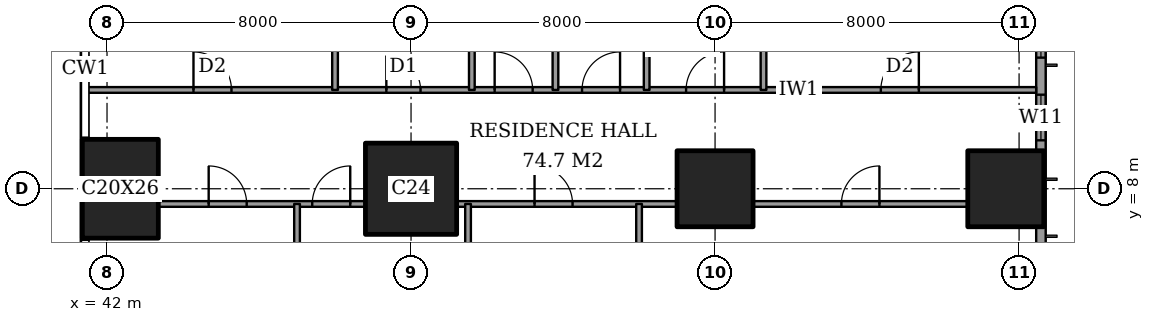
"""IFC4 building model, lengths in metres.
Left out: names, types, materials, properties, quantities, classifications, styles, units other than length and angle.
Written with IfcOpenShell. Run it as: python <this file> out.ifc"""

import sys

from ifc_helpers import new_model, si_unit, direction, frame, frame_2d, origin, origin_2d, place, context, subcontext, project, spatial, rectangle, extrude, element, fill, save


model = new_model("IFC4")
c1 = context("Model", 3, precision=1e-05, world=origin(), true_north=direction((0.0, 1.0)))
c2 = subcontext(c1, "Body", "Model", "MODEL_VIEW")
j1 = project(units=[si_unit("LENGTHUNIT", "METRE"), si_unit("PLANEANGLEUNIT", "RADIAN")], contexts=[c1])
p1 = place(None, origin())
s1 = spatial("IfcSite", under=j1, at=p1, CompositionType="ELEMENT")
p2 = place(p1, origin())
s2 = spatial("IfcBuilding", under=s1, at=p2, CompositionType="ELEMENT")
p3 = place(p2, frame((0.0, 0.0, 107.0)))
s3 = spatial("IfcBuildingStorey", under=s2, at=p3, CompositionType="ELEMENT", Elevation=107.0)
p4 = place(p3, frame((42.35, 8.0, 0.0), z_axis=(0.0, 0.0, 1.0), x_axis=(1.0, 0.0, 0.0)))
e1 = element("IfcColumn", 1, at=p4, inside=s3, PredefinedType="COLUMN", context=c2, shape_type="SweptSolid", body=[
    extrude(rectangle(XDim=2.0, YDim=2.6, at=origin_2d()), origin(), (0.0, 0.0, 1.0), 3.6),
])
p5 = place(p3, frame((50.0, 8.0, 0.0), z_axis=(0.0, 0.0, 1.0), x_axis=(1.0, 0.0, 0.0)))
e2 = element("IfcColumn", 2, at=p5, inside=s3, PredefinedType="COLUMN", context=c2, shape_type="SweptSolid", body=[
    extrude(rectangle(XDim=2.4, YDim=2.4, at=origin_2d()), origin(), (0.0, 0.0, 1.0), 3.6),
])
for number, where, z_axis, x_axis in (
    (3, (58.0, 8.0, 0.0), (0.0, 0.0, 1.0), (1.0, 0.0, 0.0)),
    (4, (65.65, 8.0, 0.0), (0.0, 0.0, 1.0), (1.0, 0.0, 0.0)),
):
    element("IfcColumn", number, at=place(p3, frame(where, z_axis=z_axis, x_axis=x_axis)), inside=s3, PredefinedType="COLUMN", context=c2, shape_type="SweptSolid", body=[
        extrude(rectangle(XDim=2.0, YDim=2.0, at=origin_2d()), origin(), (0.0, 0.0, 1.0), 3.6),
    ])
p6 = place(p3, frame((66.575, 3.175, 0.0), z_axis=(0.0, 0.0, 1.0), x_axis=(0.0, 1.0, 0.0)))
e5 = element("IfcWall", 5, at=p6, inside=s3, PredefinedType="SOLIDWALL", context=c2, shape_type="SweptSolid", body=[
    extrude(rectangle(XDim=41.65, YDim=0.25, at=frame_2d((20.825, 0.0))), origin(), (0.0, 0.0, 1.0), 3.6),
])
p7 = place(p6, frame((0.775, 0.0, 0.4)))
e6 = element("IfcOpeningElement", 6, at=p7, cuts=e5, PredefinedType="OPENING", context=c2, shape_type="SweptSolid", body=[
    extrude(rectangle(XDim=2.4, YDim=2.2, at=frame_2d((1.2, 1.1))), frame((0.0, 0.135, 0.0), z_axis=(0.0, -1.0, 0.0), x_axis=(1.0, 0.0, 0.0)), (0.0, 0.0, 1.0), 0.27),
])
p8 = place(p6, frame((6.1, 0.0, 0.4)))
e7 = element("IfcOpeningElement", 7, at=p8, cuts=e5, PredefinedType="OPENING", context=c2, shape_type="SweptSolid", body=[
    extrude(rectangle(XDim=1.2, YDim=2.2, at=frame_2d((0.6, 1.1))), frame((0.0, 0.135, 0.0), z_axis=(0.0, -1.0, 0.0), x_axis=(1.0, 0.0, 0.0)), (0.0, 0.0, 1.0), 0.27),
])
p9 = place(p6, frame((8.275, 0.0, 0.4)))
e8 = element("IfcOpeningElement", 8, at=p9, cuts=e5, PredefinedType="OPENING", context=c2, shape_type="SweptSolid", body=[
    extrude(rectangle(XDim=2.4, YDim=2.2, at=frame_2d((1.2, 1.1))), frame((0.0, 0.135, 0.0), z_axis=(0.0, -1.0, 0.0), x_axis=(1.0, 0.0, 0.0)), (0.0, 0.0, 1.0), 0.27),
])
p10 = place(p6, frame((15.775, 0.0, 0.4)))
e9 = element("IfcOpeningElement", 9, at=p10, cuts=e5, PredefinedType="OPENING", context=c2, shape_type="SweptSolid", body=[
    extrude(rectangle(XDim=2.4, YDim=2.2, at=frame_2d((1.2, 1.1))), frame((0.0, 0.135, 0.0), z_axis=(0.0, -1.0, 0.0), x_axis=(1.0, 0.0, 0.0)), (0.0, 0.0, 1.0), 0.27),
])
p11 = place(p6, frame((23.475, 0.0, 0.4)))
e10 = element("IfcOpeningElement", 10, at=p11, cuts=e5, PredefinedType="OPENING", context=c2, shape_type="SweptSolid", body=[
    extrude(rectangle(XDim=2.4, YDim=2.2, at=frame_2d((1.2, 1.1))), frame((0.0, 0.135, 0.0), z_axis=(0.0, -1.0, 0.0), x_axis=(1.0, 0.0, 0.0)), (0.0, 0.0, 1.0), 0.27),
])
p12 = place(p6, frame((30.975, 0.0, 0.4)))
e11 = element("IfcOpeningElement", 11, at=p12, cuts=e5, PredefinedType="OPENING", context=c2, shape_type="SweptSolid", body=[
    extrude(rectangle(XDim=2.4, YDim=2.2, at=frame_2d((1.2, 1.1))), frame((0.0, 0.135, 0.0), z_axis=(0.0, -1.0, 0.0), x_axis=(1.0, 0.0, 0.0)), (0.0, 0.0, 1.0), 0.27),
])
p13 = place(p6, frame((34.5, 0.0, 0.4)))
e12 = element("IfcOpeningElement", 12, at=p13, cuts=e5, PredefinedType="OPENING", context=c2, shape_type="SweptSolid", body=[
    extrude(rectangle(XDim=1.2, YDim=2.2, at=frame_2d((0.6, 1.1))), frame((0.0, 0.135, 0.0), z_axis=(0.0, -1.0, 0.0), x_axis=(1.0, 0.0, 0.0)), (0.0, 0.0, 1.0), 0.27),
])
p14 = place(p6, frame((38.475, 0.0, 0.4)))
e13 = element("IfcOpeningElement", 13, at=p14, cuts=e5, PredefinedType="OPENING", context=c2, shape_type="SweptSolid", body=[
    extrude(rectangle(XDim=2.4, YDim=2.2, at=frame_2d((1.2, 1.1))), frame((0.0, 0.135, 0.0), z_axis=(0.0, -1.0, 0.0), x_axis=(1.0, 0.0, 0.0)), (0.0, 0.0, 1.0), 0.27),
])
p15 = place(p3, frame((43.35, 7.6, 0.0), z_axis=(0.0, 0.0, 1.0), x_axis=(1.0, 0.0, 0.0)))
e14 = element("IfcWall", 14, at=p15, inside=s3, PredefinedType="PARTITIONING", context=c2, shape_type="SweptSolid", body=[
    extrude(rectangle(XDim=5.45, YDim=0.15, at=frame_2d((2.725, 0.0))), origin(), (0.0, 0.0, 1.0), 3.35),
])
p16 = place(p15, frame((4.05, 0.0, 0.0)))
e15 = element("IfcOpeningElement", 15, at=p16, cuts=e14, PredefinedType="OPENING", context=c2, shape_type="SweptSolid", body=[
    extrude(rectangle(XDim=1.0, YDim=2.1, at=frame_2d((0.5, 1.05))), frame((0.0, 0.085, 0.0), z_axis=(0.0, -1.0, 0.0), x_axis=(1.0, 0.0, 0.0)), (0.0, 0.0, 1.0), 0.17),
])
p17 = place(p15, frame((1.325, 0.0, 0.0)))
e16 = element("IfcOpeningElement", 16, at=p17, cuts=e14, PredefinedType="OPENING", context=c2, shape_type="SweptSolid", body=[
    extrude(rectangle(XDim=1.0, YDim=2.1, at=frame_2d((0.5, 1.05))), frame((0.0, 0.085, 0.0), z_axis=(0.0, -1.0, 0.0), x_axis=(1.0, 0.0, 0.0)), (0.0, 0.0, 1.0), 0.17),
])
p18 = place(p3, frame((51.2, 7.6, 0.0), z_axis=(0.0, 0.0, 1.0), x_axis=(1.0, 0.0, 0.0)))
e17 = element("IfcWall", 17, at=p18, inside=s3, PredefinedType="PARTITIONING", context=c2, shape_type="SweptSolid", body=[
    extrude(rectangle(XDim=5.8, YDim=0.15, at=frame_2d((2.9, 0.0))), origin(), (0.0, 0.0, 1.0), 3.35),
])
p19 = place(p18, frame((2.05, 0.0, 0.0)))
e18 = element("IfcOpeningElement", 18, at=p19, cuts=e17, PredefinedType="OPENING", context=c2, shape_type="SweptSolid", body=[
    extrude(rectangle(XDim=1.0, YDim=2.1, at=frame_2d((0.5, 1.05))), frame((0.0, 0.085, 0.0), z_axis=(0.0, -1.0, 0.0), x_axis=(1.0, 0.0, 0.0)), (0.0, 0.0, 1.0), 0.17),
])
p20 = place(p3, frame((59.0, 7.6, 0.0), z_axis=(0.0, 0.0, 1.0), x_axis=(1.0, 0.0, 0.0)))
e19 = element("IfcWall", 19, at=p20, inside=s3, PredefinedType="PARTITIONING", context=c2, shape_type="SweptSolid", body=[
    extrude(rectangle(XDim=5.65, YDim=0.15, at=frame_2d((2.825, 0.0))), origin(), (0.0, 0.0, 1.0), 3.35),
])
p21 = place(p20, frame((2.325, 0.0, 0.0)))
e20 = element("IfcOpeningElement", 20, at=p21, cuts=e19, PredefinedType="OPENING", context=c2, shape_type="SweptSolid", body=[
    extrude(rectangle(XDim=1.0, YDim=2.1, at=frame_2d((0.5, 1.05))), frame((0.0, 0.085, 0.0), z_axis=(0.0, -1.0, 0.0), x_axis=(1.0, 0.0, 0.0)), (0.0, 0.0, 1.0), 0.17),
])
p22 = place(p3, frame((41.439, 10.6, 0.0), z_axis=(0.0, 0.0, 1.0), x_axis=(1.0, 0.0, 0.0)))
e21 = element("IfcWall", 21, at=p22, inside=s3, PredefinedType="PARTITIONING", context=c2, shape_type="SweptSolid", body=[
    extrude(rectangle(XDim=25.011, YDim=0.15, at=frame_2d((12.505, 0.0))), origin(), (0.0, 0.0, 1.0), 3.35),
])
p23 = place(p22, frame((10.761, 0.0, 0.0)))
e22 = element("IfcOpeningElement", 22, at=p23, cuts=e21, PredefinedType="OPENING", context=c2, shape_type="SweptSolid", body=[
    extrude(rectangle(XDim=1.0, YDim=2.1, at=frame_2d((0.5, 1.05))), frame((0.0, 0.085, 0.0), z_axis=(0.0, -1.0, 0.0), x_axis=(1.0, 0.0, 0.0)), (0.0, 0.0, 1.0), 0.17),
])
p24 = place(p22, frame((20.924, 0.0, 0.0)))
e23 = element("IfcOpeningElement", 23, at=p24, cuts=e21, PredefinedType="OPENING", context=c2, shape_type="SweptSolid", body=[
    extrude(rectangle(XDim=1.0, YDim=2.1, at=frame_2d((0.5, 1.05))), frame((0.0, 0.085, 0.0), z_axis=(0.0, -1.0, 0.0), x_axis=(1.0, 0.0, 0.0)), (0.0, 0.0, 1.0), 0.17),
])
p25 = place(p22, frame((15.799, 0.0, 0.0)))
e24 = element("IfcOpeningElement", 24, at=p25, cuts=e21, PredefinedType="OPENING", context=c2, shape_type="SweptSolid", body=[
    extrude(rectangle(XDim=1.0, YDim=2.1, at=frame_2d((0.5, 1.05))), frame((0.0, 0.085, 0.0), z_axis=(0.0, -1.0, 0.0), x_axis=(1.0, 0.0, 0.0)), (0.0, 0.0, 1.0), 0.17),
])
p26 = place(p22, frame((13.061, 0.0, 0.0)))
e25 = element("IfcOpeningElement", 25, at=p26, cuts=e21, PredefinedType="OPENING", context=c2, shape_type="SweptSolid", body=[
    extrude(rectangle(XDim=1.0, YDim=2.1, at=frame_2d((0.5, 1.05))), frame((0.0, 0.085, 0.0), z_axis=(0.0, -1.0, 0.0), x_axis=(1.0, 0.0, 0.0)), (0.0, 0.0, 1.0), 0.17),
])
p27 = place(p22, frame((7.911, 0.0, 0.0)))
e26 = element("IfcOpeningElement", 26, at=p27, cuts=e21, PredefinedType="OPENING", context=c2, shape_type="SweptSolid", body=[
    extrude(rectangle(XDim=0.9, YDim=2.1, at=frame_2d((0.45, 1.05))), frame((0.0, 0.085, 0.0), z_axis=(0.0, -1.0, 0.0), x_axis=(1.0, 0.0, 0.0)), (0.0, 0.0, 1.0), 0.17),
])
p28 = place(p22, frame((2.836, 0.0, 0.0)))
e27 = element("IfcOpeningElement", 27, at=p28, cuts=e21, PredefinedType="OPENING", context=c2, shape_type="SweptSolid", body=[
    extrude(rectangle(XDim=1.0, YDim=2.1, at=frame_2d((0.5, 1.05))), frame((0.0, 0.085, 0.0), z_axis=(0.0, -1.0, 0.0), x_axis=(1.0, 0.0, 0.0)), (0.0, 0.0, 1.0), 0.17),
])
p29 = place(p3, frame((47.0, -0.45, 0.0), z_axis=(0.0, 0.0, 1.0), x_axis=(0.0, 1.0, 0.0)))
e28 = element("IfcWall", 28, at=p29, inside=s3, PredefinedType="PARTITIONING", context=c2, shape_type="SweptSolid", body=[
    extrude(rectangle(XDim=8.05, YDim=0.15, at=frame_2d((4.025, 0.0))), origin(), (0.0, 0.0, 1.0), 3.35),
])
p30 = place(p3, frame((48.0, 10.6, 0.0), z_axis=(0.0, 0.0, 1.0), x_axis=(0.0, 1.0, 0.0)))
e29 = element("IfcWall", 29, at=p30, inside=s3, PredefinedType="PARTITIONING", context=c2, shape_type="SweptSolid", body=[
    extrude(rectangle(XDim=13.4, YDim=0.15, at=frame_2d((6.7, 0.0))), origin(), (0.0, 0.0, 1.0), 3.35),
])
p31 = place(p30, frame((10.8, 0.0, 0.0)))
e30 = element("IfcOpeningElement", 30, at=p31, cuts=e29, PredefinedType="OPENING", context=c2, shape_type="SweptSolid", body=[
    extrude(rectangle(XDim=1.2, YDim=2.4, at=frame_2d((0.6, 1.2))), frame((0.0, 0.085, 0.0), z_axis=(0.0, -1.0, 0.0), x_axis=(1.0, 0.0, 0.0)), (0.0, 0.0, 1.0), 0.17),
])
p32 = place(p30, frame((6.7, 0.0, 0.0)))
e31 = element("IfcOpeningElement", 31, at=p32, cuts=e29, PredefinedType="OPENING", context=c2, shape_type="SweptSolid", body=[
    extrude(rectangle(XDim=0.9, YDim=2.1, at=frame_2d((0.45, 1.05))), frame((0.0, 0.085, 0.0), z_axis=(0.0, -1.0, 0.0), x_axis=(1.0, 0.0, 0.0)), (0.0, 0.0, 1.0), 0.17),
])
p33 = place(p3, frame((51.5, -0.45, 0.0), z_axis=(0.0, 0.0, 1.0), x_axis=(0.0, 1.0, 0.0)))
e32 = element("IfcWall", 32, at=p33, inside=s3, PredefinedType="PARTITIONING", context=c2, shape_type="SweptSolid", body=[
    extrude(rectangle(XDim=8.05, YDim=0.15, at=frame_2d((4.025, 0.0))), origin(), (0.0, 0.0, 1.0), 3.35),
])
for number, where, z_axis, x_axis in (
    (33, (51.6, 10.6, 0.0), (0.0, 0.0, 1.0), (0.0, 1.0, 0.0)),
    (34, (53.8, 10.6, 0.0), (0.0, 0.0, 1.0), (0.0, 1.0, 0.0)),
):
    element("IfcWall", number, at=place(p3, frame(where, z_axis=z_axis, x_axis=x_axis)), inside=s3, PredefinedType="PARTITIONING", context=c2, shape_type="SweptSolid", body=[
        extrude(rectangle(XDim=4.0, YDim=0.15, at=frame_2d((2.0, 0.0))), origin(), (0.0, 0.0, 1.0), 3.35),
    ])
p34 = place(p3, frame((56.0, -0.45, 0.0), z_axis=(0.0, 0.0, 1.0), x_axis=(0.0, 1.0, 0.0)))
e35 = element("IfcWall", 35, at=p34, inside=s3, PredefinedType="PARTITIONING", context=c2, shape_type="SweptSolid", body=[
    extrude(rectangle(XDim=8.05, YDim=0.15, at=frame_2d((4.025, 0.0))), origin(), (0.0, 0.0, 1.0), 3.35),
])
p35 = place(p3, frame((56.2, 10.6, 0.0), z_axis=(0.0, 0.0, 1.0), x_axis=(0.0, 1.0, 0.0)))
e36 = element("IfcWall", 36, at=p35, inside=s3, PredefinedType="PARTITIONING", context=c2, shape_type="SweptSolid", body=[
    extrude(rectangle(XDim=11.0, YDim=0.15, at=frame_2d((5.5, 0.0))), origin(), (0.0, 0.0, 1.0), 3.35),
])
p36 = place(p35, frame((7.0, 0.0, 0.0)))
e37 = element("IfcOpeningElement", 37, at=p36, cuts=e36, PredefinedType="OPENING", context=c2, shape_type="SweptSolid", body=[
    extrude(rectangle(XDim=1.0, YDim=2.1, at=frame_2d((0.5, 1.05))), frame((0.0, 0.085, 0.0), z_axis=(0.0, -1.0, 0.0), x_axis=(1.0, 0.0, 0.0)), (0.0, 0.0, 1.0), 0.17),
])
p37 = place(p3, frame((59.275, 10.6, 0.0), z_axis=(0.0, 0.0, 1.0), x_axis=(0.0, 1.0, 0.0)))
e38 = element("IfcWall", 38, at=p37, inside=s3, PredefinedType="PARTITIONING", context=c2, shape_type="SweptSolid", body=[
    extrude(rectangle(XDim=4.2, YDim=0.15, at=frame_2d((2.1, 0.0))), origin(), (0.0, 0.0, 1.0), 3.35),
])
p38 = place(p8, origin())
e39 = element("IfcWindow", 39, at=p38, inside=s3, PartitioningType="SINGLE_PANEL", PredefinedType="WINDOW", context=c2, shape_type="SweptSolid", body=[
    extrude(rectangle(XDim=1.2, YDim=2.2, at=frame_2d((0.6, 1.1))), frame((0.0, 0.03, 0.0), z_axis=(0.0, -1.0, 0.0), x_axis=(1.0, 0.0, 0.0)), (0.0, 0.0, 1.0), 0.06),
])
fill(e7, e39)
p39 = place(p9, origin())
e40 = element("IfcWindow", 40, at=p39, inside=s3, PartitioningType="SINGLE_PANEL", PredefinedType="WINDOW", context=c2, shape_type="SweptSolid", body=[
    extrude(rectangle(XDim=2.4, YDim=2.2, at=frame_2d((1.2, 1.1))), frame((0.0, 0.03, 0.0), z_axis=(0.0, -1.0, 0.0), x_axis=(1.0, 0.0, 0.0)), (0.0, 0.0, 1.0), 0.06),
])
fill(e8, e40)
p40 = place(p21, origin())
e41 = element("IfcDoor", 41, at=p40, inside=s3, OperationType="SINGLE_SWING_LEFT", PredefinedType="DOOR", context=c2, shape_type="SweptSolid", body=[
    extrude(rectangle(XDim=1.0, YDim=2.1, at=frame_2d((0.5, 1.05))), frame((0.0, 0.025, 0.0), z_axis=(0.0, -1.0, 0.0), x_axis=(1.0, 0.0, 0.0)), (0.0, 0.0, 1.0), 0.05),
])
fill(e20, e41)
p41 = place(p19, origin())
e42 = element("IfcDoor", 42, at=p41, inside=s3, OperationType="SINGLE_SWING_RIGHT", PredefinedType="DOOR", context=c2, shape_type="SweptSolid", body=[
    extrude(rectangle(XDim=1.0, YDim=2.1, at=frame_2d((0.5, 1.05))), frame((0.0, 0.025, 0.0), z_axis=(0.0, -1.0, 0.0), x_axis=(1.0, 0.0, 0.0)), (0.0, 0.0, 1.0), 0.05),
])
fill(e18, e42)
p42 = place(p16, origin())
e43 = element("IfcDoor", 43, at=p42, inside=s3, OperationType="SINGLE_SWING_LEFT", PredefinedType="DOOR", context=c2, shape_type="SweptSolid", body=[
    extrude(rectangle(XDim=1.0, YDim=2.1, at=frame_2d((0.5, 1.05))), frame((0.0, 0.025, 0.0), z_axis=(0.0, -1.0, 0.0), x_axis=(1.0, 0.0, 0.0)), (0.0, 0.0, 1.0), 0.05),
])
fill(e15, e43)
p43 = place(p17, origin())
e44 = element("IfcDoor", 44, at=p43, inside=s3, OperationType="SINGLE_SWING_RIGHT", PredefinedType="DOOR", context=c2, shape_type="SweptSolid", body=[
    extrude(rectangle(XDim=1.0, YDim=2.1, at=frame_2d((0.5, 1.05))), frame((0.0, 0.025, 0.0), z_axis=(0.0, -1.0, 0.0), x_axis=(1.0, 0.0, 0.0)), (0.0, 0.0, 1.0), 0.05),
])
fill(e16, e44)
p44 = place(p23, origin())
e45 = element("IfcDoor", 45, at=p44, inside=s3, OperationType="SINGLE_SWING_RIGHT", PredefinedType="DOOR", context=c2, shape_type="SweptSolid", body=[
    extrude(rectangle(XDim=1.0, YDim=2.1, at=frame_2d((0.5, 1.05))), frame((0.0, 0.025, 0.0), z_axis=(0.0, -1.0, 0.0), x_axis=(1.0, 0.0, 0.0)), (0.0, 0.0, 1.0), 0.05),
])
fill(e22, e45)
p45 = place(p24, origin())
e46 = element("IfcDoor", 46, at=p45, inside=s3, OperationType="SINGLE_SWING_LEFT", PredefinedType="DOOR", context=c2, shape_type="SweptSolid", body=[
    extrude(rectangle(XDim=1.0, YDim=2.1, at=frame_2d((0.5, 1.05))), frame((0.0, 0.025, 0.0), z_axis=(0.0, -1.0, 0.0), x_axis=(1.0, 0.0, 0.0)), (0.0, 0.0, 1.0), 0.05),
])
fill(e23, e46)
p46 = place(p25, origin())
e47 = element("IfcDoor", 47, at=p46, inside=s3, OperationType="SINGLE_SWING_LEFT", PredefinedType="DOOR", context=c2, shape_type="SweptSolid", body=[
    extrude(rectangle(XDim=1.0, YDim=2.1, at=frame_2d((0.5, 1.05))), frame((0.0, 0.025, 0.0), z_axis=(0.0, -1.0, 0.0), x_axis=(1.0, 0.0, 0.0)), (0.0, 0.0, 1.0), 0.05),
])
fill(e24, e47)
p47 = place(p26, origin())
e48 = element("IfcDoor", 48, at=p47, inside=s3, OperationType="SINGLE_SWING_LEFT", PredefinedType="DOOR", context=c2, shape_type="SweptSolid", body=[
    extrude(rectangle(XDim=1.0, YDim=2.1, at=frame_2d((0.5, 1.05))), frame((0.0, 0.025, 0.0), z_axis=(0.0, -1.0, 0.0), x_axis=(1.0, 0.0, 0.0)), (0.0, 0.0, 1.0), 0.05),
])
fill(e25, e48)
p48 = place(p27, origin())
e49 = element("IfcDoor", 49, at=p48, inside=s3, OperationType="SINGLE_SWING_RIGHT", PredefinedType="DOOR", context=c2, shape_type="SweptSolid", body=[
    extrude(rectangle(XDim=0.9, YDim=2.1, at=frame_2d((0.45, 1.05))), frame((0.0, 0.025, 0.0), z_axis=(0.0, -1.0, 0.0), x_axis=(1.0, 0.0, 0.0)), (0.0, 0.0, 1.0), 0.05),
])
fill(e26, e49)
p49 = place(p28, origin())
e50 = element("IfcDoor", 50, at=p49, inside=s3, OperationType="SINGLE_SWING_RIGHT", PredefinedType="DOOR", context=c2, shape_type="SweptSolid", body=[
    extrude(rectangle(XDim=1.0, YDim=2.1, at=frame_2d((0.5, 1.05))), frame((0.0, 0.025, 0.0), z_axis=(0.0, -1.0, 0.0), x_axis=(1.0, 0.0, 0.0)), (0.0, 0.0, 1.0), 0.05),
])
fill(e27, e50)
save(model, sys.argv[1])
